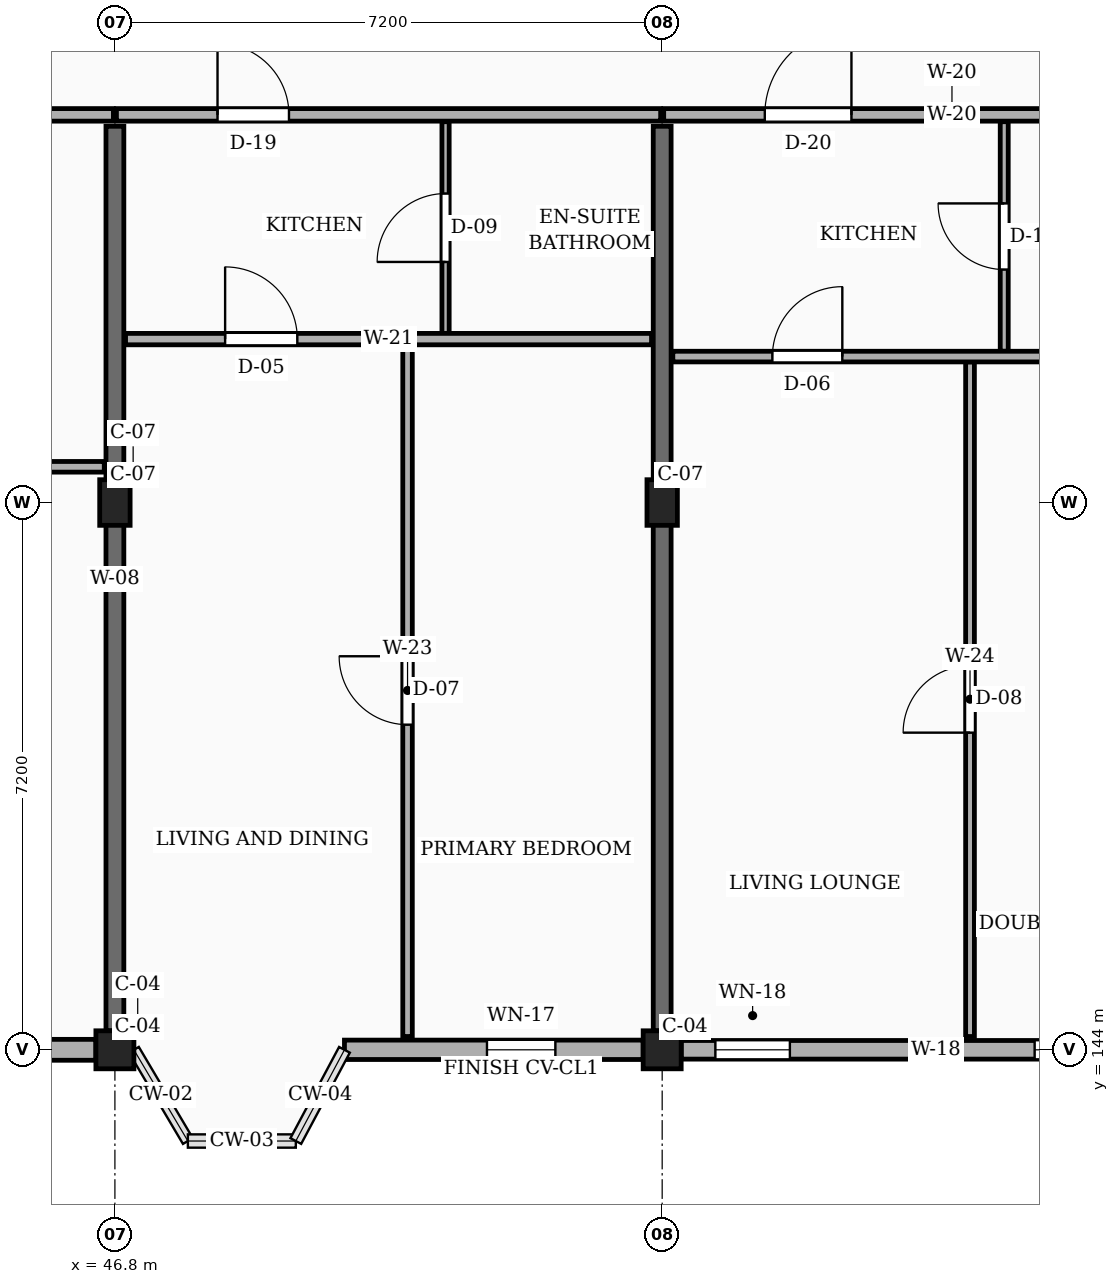
"""IFC4 building model, lengths in metres.
Left out: names, types, materials, properties, quantities, classifications, styles, units other than length and angle.
Written with IfcOpenShell. Run it as: python <this file> out.ifc"""

import sys

from ifc_helpers import new_model, si_unit, direction, frame, frame_2d, origin, origin_2d, place, context, subcontext, project, spatial, rectangle, extrude, element, fill, save


model = new_model("IFC4")
c1 = context("Model", 3, precision=1e-05, world=origin(), true_north=direction((0.0, 1.0)))
c2 = subcontext(c1, "Body", "Model", "MODEL_VIEW")
j1 = project(units=[si_unit("LENGTHUNIT", "METRE"), si_unit("PLANEANGLEUNIT", "RADIAN")], contexts=[c1])
p1 = place(None, origin())
s1 = spatial("IfcSite", under=j1, at=p1, CompositionType="ELEMENT")
p2 = place(p1, origin())
s2 = spatial("IfcBuilding", under=s1, at=p2, CompositionType="ELEMENT")
p3 = place(p2, frame((0.0, 0.0, 23.4)))
s3 = spatial("IfcBuildingStorey", under=s2, at=p3, CompositionType="ELEMENT", Elevation=23.4)
p4 = place(p3, frame((46.8, 144.0, 0.0), z_axis=(0.0, 0.0, 1.0), x_axis=(1.0, 0.0, 0.0)))
e1 = element("IfcColumn", 1, at=p4, inside=s3, PredefinedType="COLUMN", context=c2, shape_type="SweptSolid", body=[
    extrude(rectangle(XDim=0.5, YDim=0.5, at=origin_2d()), origin(), (0.0, 0.0, 1.0), 3.15),
])
p5 = place(p3, frame((46.8, 151.2, 0.0), z_axis=(0.0, 0.0, 1.0), x_axis=(1.0, 0.0, 0.0)))
e2 = element("IfcColumn", 2, at=p5, inside=s3, PredefinedType="COLUMN", context=c2, shape_type="SweptSolid", body=[
    extrude(rectangle(XDim=0.4, YDim=0.6, at=origin_2d()), origin(), (0.0, 0.0, 1.0), 3.15),
])
p6 = place(p3, frame((54.0, 144.0, 0.0), z_axis=(0.0, 0.0, 1.0), x_axis=(1.0, 0.0, 0.0)))
e3 = element("IfcColumn", 3, at=p6, inside=s3, PredefinedType="COLUMN", context=c2, shape_type="SweptSolid", body=[
    extrude(rectangle(XDim=0.5, YDim=0.5, at=origin_2d()), origin(), (0.0, 0.0, 1.0), 3.15),
])
p7 = place(p3, frame((54.0, 151.2, 0.0), z_axis=(0.0, 0.0, 1.0), x_axis=(1.0, 0.0, 0.0)))
e4 = element("IfcColumn", 4, at=p7, inside=s3, PredefinedType="COLUMN", context=c2, shape_type="SweptSolid", body=[
    extrude(rectangle(XDim=0.4, YDim=0.6, at=origin_2d()), origin(), (0.0, 0.0, 1.0), 3.15),
])
for number, where, z_axis, x_axis in (
    (5, (46.8, 144.25, 0.0), (0.0, 0.0, 1.0), (0.0, 1.0, 0.0)),
    (6, (54.0, 144.25, 0.0), (0.0, 0.0, 1.0), (0.0, 1.0, 0.0)),
):
    element("IfcWall", number, at=place(p3, frame(where, z_axis=z_axis, x_axis=x_axis)), inside=s3, PredefinedType="SOLIDWALL", context=c2, shape_type="SweptSolid", body=[
        extrude(rectangle(XDim=11.9, YDim=0.235, at=frame_2d((5.95, 0.0))), origin(), (0.0, 0.0, 1.0), 2.185),
    ])
p8 = place(p3, frame((39.85, 144.0, 0.0), z_axis=(0.0, 0.0, 1.0), x_axis=(1.0, 0.0, 0.0)))
e7 = element("IfcWall", 7, at=p8, inside=s3, PredefinedType="SOLIDWALL", context=c2, shape_type="SweptSolid", body=[
    extrude(rectangle(XDim=6.7, YDim=0.275, at=frame_2d((3.35, 0.0))), origin(), (0.0, 0.0, 1.0), 2.455),
])
p9 = place(p8, frame((0.45, 0.0, 0.78)))
e8 = element("IfcOpeningElement", 8, at=p9, cuts=e7, PredefinedType="OPENING", context=c2, shape_type="SweptSolid", body=[
    extrude(rectangle(XDim=1.36, YDim=1.26, at=frame_2d((0.68, 0.63))), frame((0.0, 0.147, 0.0), z_axis=(0.0, -1.0, 0.0), x_axis=(1.0, 0.0, 0.0)), (0.0, 0.0, 1.0), 0.295),
])
p10 = place(p8, frame((4.65, 0.0, 0.78)))
e9 = element("IfcOpeningElement", 9, at=p10, cuts=e7, PredefinedType="OPENING", context=c2, shape_type="SweptSolid", body=[
    extrude(rectangle(XDim=0.9, YDim=1.36, at=frame_2d((0.45, 0.68))), frame((0.0, 0.147, 0.0), z_axis=(0.0, -1.0, 0.0), x_axis=(1.0, 0.0, 0.0)), (0.0, 0.0, 1.0), 0.295),
])
p11 = place(p3, frame((49.82, 144.0, 0.0), z_axis=(0.0, 0.0, 1.0), x_axis=(1.0, 0.0, 0.0)))
e10 = element("IfcWall", 10, at=p11, inside=s3, PredefinedType="SOLIDWALL", context=c2, shape_type="SweptSolid", body=[
    extrude(rectangle(XDim=3.93, YDim=0.255, at=frame_2d((1.965, 0.0))), origin(), (0.0, 0.0, 1.0), 2.455),
])
p12 = place(p11, frame((1.875, 0.0, 0.78)))
e11 = element("IfcOpeningElement", 11, at=p12, cuts=e10, PredefinedType="OPENING", context=c2, shape_type="SweptSolid", body=[
    extrude(rectangle(XDim=0.9, YDim=1.36, at=frame_2d((0.45, 0.68))), frame((0.0, 0.137, 0.0), z_axis=(0.0, -1.0, 0.0), x_axis=(1.0, 0.0, 0.0)), (0.0, 0.0, 1.0), 0.275),
])
p13 = place(p3, frame((54.25, 144.0, 0.0), z_axis=(0.0, 0.0, 1.0), x_axis=(1.0, 0.0, 0.0)))
e12 = element("IfcWall", 12, at=p13, inside=s3, PredefinedType="SOLIDWALL", context=c2, shape_type="SweptSolid", body=[
    extrude(rectangle(XDim=6.7, YDim=0.245, at=frame_2d((3.35, 0.0))), origin(), (0.0, 0.0, 1.0), 2.455),
])
p14 = place(p13, frame((0.45, 0.0, 0.78)))
e13 = element("IfcOpeningElement", 13, at=p14, cuts=e12, PredefinedType="OPENING", context=c2, shape_type="SweptSolid", body=[
    extrude(rectangle(XDim=0.98, YDim=1.36, at=frame_2d((0.49, 0.68))), frame((0.0, 0.133, 0.0), z_axis=(0.0, -1.0, 0.0), x_axis=(1.0, 0.0, 0.0)), (0.0, 0.0, 1.0), 0.265),
])
p15 = place(p13, frame((4.65, 0.0, 0.78)))
e14 = element("IfcOpeningElement", 14, at=p15, cuts=e12, PredefinedType="OPENING", context=c2, shape_type="SweptSolid", body=[
    extrude(rectangle(XDim=1.14, YDim=1.36, at=frame_2d((0.57, 0.68))), frame((0.0, 0.133, 0.0), z_axis=(0.0, -1.0, 0.0), x_axis=(1.0, 0.0, 0.0)), (0.0, 0.0, 1.0), 0.265),
])
p16 = place(p3, frame((39.62, 156.3, 0.0), z_axis=(0.0, 0.0, 1.0), x_axis=(1.0, 0.0, 0.0)))
e15 = element("IfcWall", 15, at=p16, inside=s3, PredefinedType="PARTITIONING", context=c2, shape_type="SweptSolid", body=[
    extrude(rectangle(XDim=7.16, YDim=0.165, at=frame_2d((3.58, 0.0))), origin(), (0.0, 0.0, 1.0), 2.32),
])
p17 = place(p16, frame((4.78, 0.0, 0.0)))
e16 = element("IfcOpeningElement", 16, at=p17, cuts=e15, PredefinedType="OPENING", context=c2, shape_type="SweptSolid", body=[
    extrude(rectangle(XDim=1.0, YDim=2.15, at=frame_2d((0.5, 1.075))), frame((0.0, 0.093, 0.0), z_axis=(0.0, -1.0, 0.0), x_axis=(1.0, 0.0, 0.0)), (0.0, 0.0, 1.0), 0.185),
])
p18 = place(p3, frame((46.82, 156.3, 0.0), z_axis=(0.0, 0.0, 1.0), x_axis=(1.0, 0.0, 0.0)))
e17 = element("IfcWall", 17, at=p18, inside=s3, PredefinedType="PARTITIONING", context=c2, shape_type="SweptSolid", body=[
    extrude(rectangle(XDim=7.16, YDim=0.165, at=frame_2d((3.58, 0.0))), origin(), (0.0, 0.0, 1.0), 2.32),
])
p19 = place(p18, frame((1.33, 0.0, 0.0)))
e18 = element("IfcOpeningElement", 18, at=p19, cuts=e17, PredefinedType="OPENING", context=c2, shape_type="SweptSolid", body=[
    extrude(rectangle(XDim=0.94, YDim=2.12, at=frame_2d((0.47, 1.06))), frame((0.0, 0.093, 0.0), z_axis=(0.0, -1.0, 0.0), x_axis=(1.0, 0.0, 0.0)), (0.0, 0.0, 1.0), 0.185),
])
p20 = place(p3, frame((54.02, 156.3, 0.0), z_axis=(0.0, 0.0, 1.0), x_axis=(1.0, 0.0, 0.0)))
e19 = element("IfcWall", 19, at=p20, inside=s3, PredefinedType="PARTITIONING", context=c2, shape_type="SweptSolid", body=[
    extrude(rectangle(XDim=7.16, YDim=0.165, at=frame_2d((3.58, 0.0))), origin(), (0.0, 0.0, 1.0), 2.32),
])
p21 = place(p20, frame((1.33, 0.0, 0.0)))
e20 = element("IfcOpeningElement", 20, at=p21, cuts=e19, PredefinedType="OPENING", context=c2, shape_type="SweptSolid", body=[
    extrude(rectangle(XDim=1.14, YDim=2.18, at=frame_2d((0.57, 1.09))), frame((0.0, 0.093, 0.0), z_axis=(0.0, -1.0, 0.0), x_axis=(1.0, 0.0, 0.0)), (0.0, 0.0, 1.0), 0.185),
])
p22 = place(p3, frame((39.74, 151.67, 0.0), z_axis=(0.0, 0.0, 1.0), x_axis=(1.0, 0.0, 0.0)))
e21 = element("IfcWall", 21, at=p22, inside=s3, PredefinedType="PARTITIONING", context=c2, shape_type="SweptSolid", body=[
    extrude(rectangle(XDim=6.92, YDim=0.14, at=frame_2d((3.46, 0.0))), origin(), (0.0, 0.0, 1.0), 2.32),
])
p23 = place(p22, frame((4.66, 0.0, 0.0)))
e22 = element("IfcOpeningElement", 22, at=p23, cuts=e21, PredefinedType="OPENING", context=c2, shape_type="SweptSolid", body=[
    extrude(rectangle(XDim=0.95, YDim=2.1, at=frame_2d((0.475, 1.05))), frame((0.0, 0.08, 0.0), z_axis=(0.0, -1.0, 0.0), x_axis=(1.0, 0.0, 0.0)), (0.0, 0.0, 1.0), 0.16),
])
p24 = place(p3, frame((50.65, 144.175, 0.0), z_axis=(0.0, 0.0, 1.0), x_axis=(0.0, 1.0, 0.0)))
e23 = element("IfcWall", 23, at=p24, inside=s3, PredefinedType="PARTITIONING", context=c2, shape_type="SweptSolid", body=[
    extrude(rectangle(XDim=9.105, YDim=0.125, at=frame_2d((4.552, 0.0))), origin(), (0.0, 0.0, 1.0), 2.32),
])
p25 = place(p24, frame((4.103, 0.0, 0.0)))
e24 = element("IfcOpeningElement", 24, at=p25, cuts=e23, PredefinedType="OPENING", context=c2, shape_type="SweptSolid", body=[
    extrude(rectangle(XDim=0.9, YDim=2.1, at=frame_2d((0.45, 1.05))), frame((0.0, 0.073, 0.0), z_axis=(0.0, -1.0, 0.0), x_axis=(1.0, 0.0, 0.0)), (0.0, 0.0, 1.0), 0.145),
])
p26 = place(p3, frame((51.15, 153.42, 0.0), z_axis=(0.0, 0.0, 1.0), x_axis=(0.0, 1.0, 0.0)))
e25 = element("IfcWall", 25, at=p26, inside=s3, PredefinedType="PARTITIONING", context=c2, shape_type="SweptSolid", body=[
    extrude(rectangle(XDim=2.79, YDim=0.095, at=frame_2d((1.395, 0.0))), origin(), (0.0, 0.0, 1.0), 2.32),
])
p27 = place(p26, frame((0.945, 0.0, 0.0)))
e26 = element("IfcOpeningElement", 26, at=p27, cuts=e25, PredefinedType="OPENING", context=c2, shape_type="SweptSolid", body=[
    extrude(rectangle(XDim=0.9, YDim=2.05, at=frame_2d((0.45, 1.025))), frame((0.0, 0.058, 0.0), z_axis=(0.0, -1.0, 0.0), x_axis=(1.0, 0.0, 0.0)), (0.0, 0.0, 1.0), 0.115),
])
p28 = place(p3, frame((46.94, 153.35, 0.0), z_axis=(0.0, 0.0, 1.0), x_axis=(1.0, 0.0, 0.0)))
e27 = element("IfcWall", 27, at=p28, inside=s3, PredefinedType="PARTITIONING", context=c2, shape_type="SweptSolid", body=[
    extrude(rectangle(XDim=6.92, YDim=0.15, at=frame_2d((3.46, 0.0))), origin(), (0.0, 0.0, 1.0), 2.32),
])
p29 = place(p28, frame((1.31, 0.0, 0.0)))
e28 = element("IfcOpeningElement", 28, at=p29, cuts=e27, PredefinedType="OPENING", context=c2, shape_type="SweptSolid", body=[
    extrude(rectangle(XDim=0.95, YDim=2.1, at=frame_2d((0.475, 1.05))), frame((0.0, 0.085, 0.0), z_axis=(0.0, -1.0, 0.0), x_axis=(1.0, 0.0, 0.0)), (0.0, 0.0, 1.0), 0.17),
])
p30 = place(p3, frame((58.05, 144.175, 0.0), z_axis=(0.0, 0.0, 1.0), x_axis=(0.0, 1.0, 0.0)))
e29 = element("IfcWall", 29, at=p30, inside=s3, PredefinedType="PARTITIONING", context=c2, shape_type="SweptSolid", body=[
    extrude(rectangle(XDim=8.875, YDim=0.115, at=frame_2d((4.438, 0.0))), origin(), (0.0, 0.0, 1.0), 2.32),
])
p31 = place(p30, frame((3.998, 0.0, 0.0)))
e30 = element("IfcOpeningElement", 30, at=p31, cuts=e29, PredefinedType="OPENING", context=c2, shape_type="SweptSolid", body=[
    extrude(rectangle(XDim=0.88, YDim=2.08, at=frame_2d((0.44, 1.04))), frame((0.0, 0.067, 0.0), z_axis=(0.0, -1.0, 0.0), x_axis=(1.0, 0.0, 0.0)), (0.0, 0.0, 1.0), 0.135),
])
p32 = place(p3, frame((58.5, 153.19, 0.0), z_axis=(0.0, 0.0, 1.0), x_axis=(0.0, 1.0, 0.0)))
e31 = element("IfcWall", 31, at=p32, inside=s3, PredefinedType="PARTITIONING", context=c2, shape_type="SweptSolid", body=[
    extrude(rectangle(XDim=3.02, YDim=0.105, at=frame_2d((1.51, 0.0))), origin(), (0.0, 0.0, 1.0), 2.32),
])
p33 = place(p32, frame((1.075, 0.0, 0.0)))
e32 = element("IfcOpeningElement", 32, at=p33, cuts=e31, PredefinedType="OPENING", context=c2, shape_type="SweptSolid", body=[
    extrude(rectangle(XDim=0.87, YDim=2.05, at=frame_2d((0.435, 1.025))), frame((0.0, 0.062, 0.0), z_axis=(0.0, -1.0, 0.0), x_axis=(1.0, 0.0, 0.0)), (0.0, 0.0, 1.0), 0.125),
])
p34 = place(p3, frame((54.14, 153.12, 0.0), z_axis=(0.0, 0.0, 1.0), x_axis=(1.0, 0.0, 0.0)))
e33 = element("IfcWall", 33, at=p34, inside=s3, PredefinedType="PARTITIONING", context=c2, shape_type="SweptSolid", body=[
    extrude(rectangle(XDim=6.92, YDim=0.14, at=frame_2d((3.46, 0.0))), origin(), (0.0, 0.0, 1.0), 2.32),
])
p35 = place(p34, frame((1.31, 0.0, 0.0)))
e34 = element("IfcOpeningElement", 34, at=p35, cuts=e33, PredefinedType="OPENING", context=c2, shape_type="SweptSolid", body=[
    extrude(rectangle(XDim=0.92, YDim=2.1, at=frame_2d((0.46, 1.05))), frame((0.0, 0.08, 0.0), z_axis=(0.0, -1.0, 0.0), x_axis=(1.0, 0.0, 0.0)), (0.0, 0.0, 1.0), 0.16),
])
p36 = place(p12, origin())
e35 = element("IfcWindow", 35, at=p36, inside=s3, PartitioningType="SINGLE_PANEL", PredefinedType="WINDOW", context=c2, shape_type="SweptSolid", body=[
    extrude(rectangle(XDim=0.9, YDim=1.36, at=frame_2d((0.45, 0.68))), frame((0.0, 0.03, 0.0), z_axis=(0.0, -1.0, 0.0), x_axis=(1.0, 0.0, 0.0)), (0.0, 0.0, 1.0), 0.06),
])
fill(e11, e35)
p37 = place(p14, origin())
e36 = element("IfcWindow", 36, at=p37, inside=s3, PartitioningType="SINGLE_PANEL", PredefinedType="WINDOW", context=c2, shape_type="SweptSolid", body=[
    extrude(rectangle(XDim=0.98, YDim=1.36, at=frame_2d((0.49, 0.68))), frame((0.0, 0.03, 0.0), z_axis=(0.0, -1.0, 0.0), x_axis=(1.0, 0.0, 0.0)), (0.0, 0.0, 1.0), 0.06),
])
fill(e13, e36)
p38 = place(p15, origin())
e37 = element("IfcWindow", 37, at=p38, inside=s3, PartitioningType="SINGLE_PANEL", PredefinedType="WINDOW", context=c2, shape_type="SweptSolid", body=[
    extrude(rectangle(XDim=1.14, YDim=1.36, at=frame_2d((0.57, 0.68))), frame((0.0, 0.03, 0.0), z_axis=(0.0, -1.0, 0.0), x_axis=(1.0, 0.0, 0.0)), (0.0, 0.0, 1.0), 0.06),
])
fill(e14, e37)
p39 = place(p19, origin())
e38 = element("IfcDoor", 38, at=p39, inside=s3, OperationType="SINGLE_SWING_LEFT", PredefinedType="DOOR", context=c2, shape_type="SweptSolid", body=[
    extrude(rectangle(XDim=0.94, YDim=2.12, at=frame_2d((0.47, 1.06))), frame((0.0, 0.025, 0.0), z_axis=(0.0, -1.0, 0.0), x_axis=(1.0, 0.0, 0.0)), (0.0, 0.0, 1.0), 0.05),
])
fill(e18, e38)
p40 = place(p21, origin())
e39 = element("IfcDoor", 39, at=p40, inside=s3, OperationType="SINGLE_SWING_RIGHT", PredefinedType="DOOR", context=c2, shape_type="SweptSolid", body=[
    extrude(rectangle(XDim=1.14, YDim=2.18, at=frame_2d((0.57, 1.09))), frame((0.0, 0.025, 0.0), z_axis=(0.0, -1.0, 0.0), x_axis=(1.0, 0.0, 0.0)), (0.0, 0.0, 1.0), 0.05),
])
fill(e20, e39)
p41 = place(p25, origin())
e40 = element("IfcDoor", 40, at=p41, inside=s3, OperationType="SINGLE_SWING_RIGHT", PredefinedType="DOOR", context=c2, shape_type="SweptSolid", body=[
    extrude(rectangle(XDim=0.9, YDim=2.1, at=frame_2d((0.45, 1.05))), frame((0.0, 0.025, 0.0), z_axis=(0.0, -1.0, 0.0), x_axis=(1.0, 0.0, 0.0)), (0.0, 0.0, 1.0), 0.05),
])
fill(e24, e40)
p42 = place(p27, origin())
e41 = element("IfcDoor", 41, at=p42, inside=s3, OperationType="SINGLE_SWING_LEFT", PredefinedType="DOOR", context=c2, shape_type="SweptSolid", body=[
    extrude(rectangle(XDim=0.9, YDim=2.05, at=frame_2d((0.45, 1.025))), frame((0.0, 0.025, 0.0), z_axis=(0.0, -1.0, 0.0), x_axis=(1.0, 0.0, 0.0)), (0.0, 0.0, 1.0), 0.05),
])
fill(e26, e41)
p43 = place(p29, origin())
e42 = element("IfcDoor", 42, at=p43, inside=s3, OperationType="SINGLE_SWING_LEFT", PredefinedType="DOOR", context=c2, shape_type="SweptSolid", body=[
    extrude(rectangle(XDim=0.95, YDim=2.1, at=frame_2d((0.475, 1.05))), frame((0.0, 0.025, 0.0), z_axis=(0.0, -1.0, 0.0), x_axis=(1.0, 0.0, 0.0)), (0.0, 0.0, 1.0), 0.05),
])
fill(e28, e42)
p44 = place(p31, origin())
e43 = element("IfcDoor", 43, at=p44, inside=s3, OperationType="SINGLE_SWING_LEFT", PredefinedType="DOOR", context=c2, shape_type="SweptSolid", body=[
    extrude(rectangle(XDim=0.88, YDim=2.08, at=frame_2d((0.44, 1.04))), frame((0.0, 0.025, 0.0), z_axis=(0.0, -1.0, 0.0), x_axis=(1.0, 0.0, 0.0)), (0.0, 0.0, 1.0), 0.05),
])
fill(e30, e43)
p45 = place(p33, origin())
e44 = element("IfcDoor", 44, at=p45, inside=s3, OperationType="SINGLE_SWING_RIGHT", PredefinedType="DOOR", context=c2, shape_type="SweptSolid", body=[
    extrude(rectangle(XDim=0.87, YDim=2.05, at=frame_2d((0.435, 1.025))), frame((0.0, 0.025, 0.0), z_axis=(0.0, -1.0, 0.0), x_axis=(1.0, 0.0, 0.0)), (0.0, 0.0, 1.0), 0.05),
])
fill(e32, e44)
p46 = place(p35, origin())
e45 = element("IfcDoor", 45, at=p46, inside=s3, OperationType="SINGLE_SWING_RIGHT", PredefinedType="DOOR", context=c2, shape_type="SweptSolid", body=[
    extrude(rectangle(XDim=0.92, YDim=2.1, at=frame_2d((0.46, 1.05))), frame((0.0, 0.025, 0.0), z_axis=(0.0, -1.0, 0.0), x_axis=(1.0, 0.0, 0.0)), (0.0, 0.0, 1.0), 0.05),
])
fill(e34, e45)
save(model, sys.argv[1])
